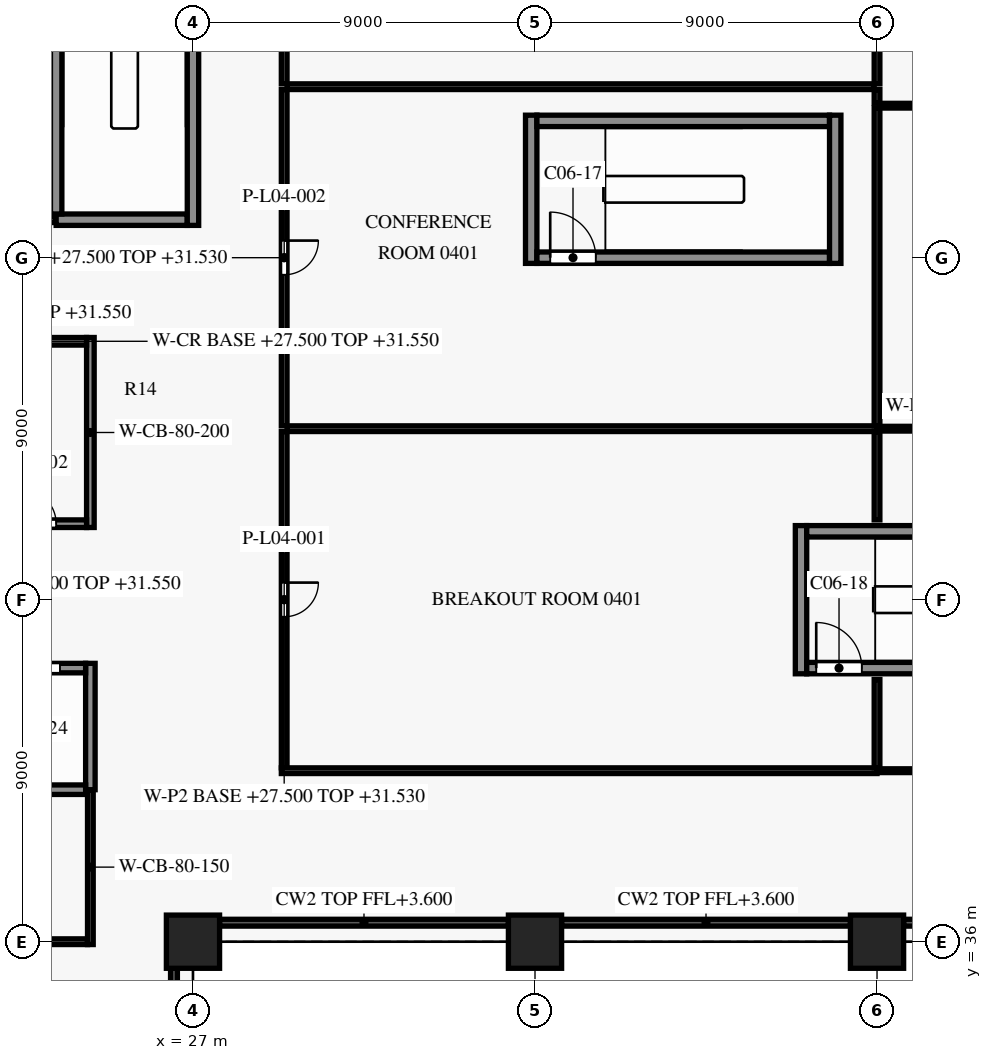
"""IFC4 building model, lengths in metres.
Left out: names, types, materials, properties, quantities, classifications, styles, units other than length and angle.
Written with IfcOpenShell. Run it as: python <this file> out.ifc"""

import sys

from ifc_helpers import new_model, si_unit, direction, frame, frame_2d, origin, origin_2d, place, context, subcontext, project, spatial, rectangle, extrude, element, fill, save


model = new_model("IFC4")
c1 = context("Model", 3, precision=1e-05, world=origin(), true_north=direction((0.0, 1.0)))
c2 = subcontext(c1, "Body", "Model", "MODEL_VIEW")
j1 = project(units=[si_unit("LENGTHUNIT", "METRE"), si_unit("PLANEANGLEUNIT", "RADIAN")], contexts=[c1])
p1 = place(None, origin())
s1 = spatial("IfcSite", under=j1, at=p1, CompositionType="ELEMENT")
p2 = place(p1, origin())
s2 = spatial("IfcBuilding", under=s1, at=p2, CompositionType="ELEMENT")
p3 = place(p2, frame((0.0, 0.0, 27.5)))
s3 = spatial("IfcBuildingStorey", under=s2, at=p3, CompositionType="ELEMENT", Elevation=27.5)
for number, where, z_axis, x_axis in (
    (1, (27.0, 36.0, 0.0), (0.0, 0.0, 1.0), (1.0, 0.0, 0.0)),
    (2, (36.0, 36.0, 0.0), (0.0, 0.0, 1.0), (1.0, 0.0, 0.0)),
    (3, (45.0, 36.0, 0.0), (0.0, 0.0, 1.0), (1.0, 0.0, 0.0)),
):
    element("IfcColumn", number, at=place(p3, frame(where, z_axis=z_axis, x_axis=x_axis)), inside=s3, PredefinedType="COLUMN", context=c2, shape_type="SweptSolid", body=[
        extrude(rectangle(XDim=1.4, YDim=1.4, at=origin_2d()), origin(), (0.0, 0.0, 1.0), 4.5),
    ])
p4 = place(p3, frame((12.4, 36.0, 0.0), z_axis=(0.0, 0.0, 1.0), x_axis=(1.0, 0.0, 0.0)))
e4 = element("IfcWall", 4, at=p4, inside=s3, PredefinedType="SHEAR", context=c2, shape_type="SweptSolid", body=[
    extrude(rectangle(XDim=11.825, YDim=0.15, at=frame_2d((5.913, 0.0))), origin(), (0.0, 0.0, 1.0), 4.2),
])
p5 = place(p4, frame((1.25, 0.0, 0.0)))
e5 = element("IfcOpeningElement", 5, at=p5, cuts=e4, PredefinedType="OPENING", context=c2, shape_type="SweptSolid", body=[
    extrude(rectangle(XDim=0.9, YDim=2.1, at=frame_2d((0.45, 1.05))), frame((0.0, 0.085, 0.0), z_axis=(0.0, -1.0, 0.0), x_axis=(1.0, 0.0, 0.0)), (0.0, 0.0, 1.0), 0.17),
])
p6 = place(p4, frame((5.2, 0.0, 0.0)))
e6 = element("IfcOpeningElement", 6, at=p6, cuts=e4, PredefinedType="OPENING", context=c2, shape_type="SweptSolid", body=[
    extrude(rectangle(XDim=0.9, YDim=2.1, at=frame_2d((0.45, 1.05))), frame((0.0, 0.085, 0.0), z_axis=(0.0, -1.0, 0.0), x_axis=(1.0, 0.0, 0.0)), (0.0, 0.0, 1.0), 0.17),
])
p7 = place(p4, frame((9.425, 0.0, 0.0)))
e7 = element("IfcOpeningElement", 7, at=p7, cuts=e4, PredefinedType="OPENING", context=c2, shape_type="SweptSolid", body=[
    extrude(rectangle(XDim=0.95, YDim=2.1, at=frame_2d((0.475, 1.05))), frame((0.0, 0.085, 0.0), z_axis=(0.0, -1.0, 0.0), x_axis=(1.0, 0.0, 0.0)), (0.0, 0.0, 1.0), 0.17),
])
p8 = place(p3, frame((8.1, 40.0, 0.0), z_axis=(0.0, 0.0, 1.0), x_axis=(1.0, 0.0, 0.0)))
e8 = element("IfcWall", 8, at=p8, inside=s3, PredefinedType="SHEAR", context=c2, shape_type="SweptSolid", body=[
    extrude(rectangle(XDim=16.075, YDim=0.25, at=frame_2d((8.038, 0.0))), origin(), (0.0, 0.0, 1.0), 4.2),
])
p9 = place(p3, frame((8.1, 43.2, 0.0), z_axis=(0.0, 0.0, 1.0), x_axis=(1.0, 0.0, 0.0)))
e9 = element("IfcWall", 9, at=p9, inside=s3, PredefinedType="SHEAR", context=c2, shape_type="SweptSolid", body=[
    extrude(rectangle(XDim=16.075, YDim=0.25, at=frame_2d((8.038, 0.0))), origin(), (0.0, 0.0, 1.0), 4.2),
])
p10 = place(p9, frame((14.3, 0.0, 0.0)))
e10 = element("IfcOpeningElement", 10, at=p10, cuts=e9, PredefinedType="OPENING", context=c2, shape_type="SweptSolid", body=[
    extrude(rectangle(XDim=1.1, YDim=2.1, at=frame_2d((0.55, 1.05))), frame((0.0, 0.135, 0.0), z_axis=(0.0, -1.0, 0.0), x_axis=(1.0, 0.0, 0.0)), (0.0, 0.0, 1.0), 0.27),
])
p11 = place(p9, frame((0.8, 0.0, 0.0)))
e11 = element("IfcOpeningElement", 11, at=p11, cuts=e9, PredefinedType="OPENING", context=c2, shape_type="SweptSolid", body=[
    extrude(rectangle(XDim=1.1, YDim=2.1, at=frame_2d((0.55, 1.05))), frame((0.0, 0.135, 0.0), z_axis=(0.0, -1.0, 0.0), x_axis=(1.0, 0.0, 0.0)), (0.0, 0.0, 1.0), 0.27),
])
p12 = place(p9, frame((3.5, 0.0, 0.0)))
e12 = element("IfcOpeningElement", 12, at=p12, cuts=e9, PredefinedType="OPENING", context=c2, shape_type="SweptSolid", body=[
    extrude(rectangle(XDim=1.1, YDim=2.1, at=frame_2d((0.55, 1.05))), frame((0.0, 0.135, 0.0), z_axis=(0.0, -1.0, 0.0), x_axis=(1.0, 0.0, 0.0)), (0.0, 0.0, 1.0), 0.27),
])
p13 = place(p9, frame((6.2, 0.0, 0.0)))
e13 = element("IfcOpeningElement", 13, at=p13, cuts=e9, PredefinedType="OPENING", context=c2, shape_type="SweptSolid", body=[
    extrude(rectangle(XDim=1.1, YDim=2.1, at=frame_2d((0.55, 1.05))), frame((0.0, 0.135, 0.0), z_axis=(0.0, -1.0, 0.0), x_axis=(1.0, 0.0, 0.0)), (0.0, 0.0, 1.0), 0.27),
])
p14 = place(p9, frame((8.9, 0.0, 0.0)))
e14 = element("IfcOpeningElement", 14, at=p14, cuts=e9, PredefinedType="OPENING", context=c2, shape_type="SweptSolid", body=[
    extrude(rectangle(XDim=1.1, YDim=2.1, at=frame_2d((0.55, 1.05))), frame((0.0, 0.135, 0.0), z_axis=(0.0, -1.0, 0.0), x_axis=(1.0, 0.0, 0.0)), (0.0, 0.0, 1.0), 0.27),
])
p15 = place(p9, frame((11.6, 0.0, 0.0)))
e15 = element("IfcOpeningElement", 15, at=p15, cuts=e9, PredefinedType="OPENING", context=c2, shape_type="SweptSolid", body=[
    extrude(rectangle(XDim=1.1, YDim=2.1, at=frame_2d((0.55, 1.05))), frame((0.0, 0.135, 0.0), z_axis=(0.0, -1.0, 0.0), x_axis=(1.0, 0.0, 0.0)), (0.0, 0.0, 1.0), 0.27),
])
p16 = place(p3, frame((43.15, 43.2, 0.0), z_axis=(0.0, 0.0, 1.0), x_axis=(1.0, 0.0, 0.0)))
e16 = element("IfcWall", 16, at=p16, inside=s3, PredefinedType="SHEAR", context=c2, shape_type="SweptSolid", body=[
    extrude(rectangle(XDim=7.7, YDim=0.3, at=frame_2d((3.85, 0.0))), origin(), (0.0, 0.0, 1.0), 4.2),
])
p17 = place(p16, frame((0.25, 0.0, 0.0)))
e17 = element("IfcOpeningElement", 17, at=p17, cuts=e16, PredefinedType="OPENING", context=c2, shape_type="SweptSolid", body=[
    extrude(rectangle(XDim=1.2, YDim=2.2, at=frame_2d((0.6, 1.1))), frame((0.0, 0.16, 0.0), z_axis=(0.0, -1.0, 0.0), x_axis=(1.0, 0.0, 0.0)), (0.0, 0.0, 1.0), 0.32),
])
p18 = place(p3, frame((43.15, 46.8, 0.0), z_axis=(0.0, 0.0, 1.0), x_axis=(1.0, 0.0, 0.0)))
e18 = element("IfcWall", 18, at=p18, inside=s3, PredefinedType="SHEAR", context=c2, shape_type="SweptSolid", body=[
    extrude(rectangle(XDim=7.7, YDim=0.3, at=frame_2d((3.85, 0.0))), origin(), (0.0, 0.0, 1.0), 4.2),
])
p19 = place(p3, frame((21.6, 47.0, 0.0), z_axis=(0.0, 0.0, 1.0), x_axis=(1.0, 0.0, 0.0)))
e19 = element("IfcWall", 19, at=p19, inside=s3, PredefinedType="PARTITIONING", context=c2, shape_type="SweptSolid", body=[
    extrude(rectangle(XDim=2.6, YDim=0.2, at=frame_2d((1.3, 0.0))), origin(), (0.0, 0.0, 1.0), 4.05),
])
p20 = place(p19, frame((0.9, 0.0, 0.0)))
e20 = element("IfcOpeningElement", 20, at=p20, cuts=e19, PredefinedType="OPENING", context=c2, shape_type="SweptSolid", body=[
    extrude(rectangle(XDim=0.9, YDim=2.1, at=frame_2d((0.45, 1.05))), frame((0.0, 0.11, 0.0), z_axis=(0.0, -1.0, 0.0), x_axis=(1.0, 0.0, 0.0)), (0.0, 0.0, 1.0), 0.22),
])
p21 = place(p3, frame((21.6, 51.8, 0.0), z_axis=(0.0, 0.0, 1.0), x_axis=(1.0, 0.0, 0.0)))
e21 = element("IfcWall", 21, at=p21, inside=s3, PredefinedType="PARTITIONING", context=c2, shape_type="SweptSolid", body=[
    extrude(rectangle(XDim=2.6, YDim=0.2, at=frame_2d((1.3, 0.0))), origin(), (0.0, 0.0, 1.0), 4.05),
])
p22 = place(p3, frame((36.05, 54.0, 0.0), z_axis=(0.0, 0.0, 1.0), x_axis=(1.0, 0.0, 0.0)))
e22 = element("IfcWall", 22, at=p22, inside=s3, PredefinedType="SHEAR", context=c2, shape_type="SweptSolid", body=[
    extrude(rectangle(XDim=7.7, YDim=0.3, at=frame_2d((3.85, 0.0))), origin(), (0.0, 0.0, 1.0), 4.2),
])
p23 = place(p22, frame((0.35, 0.0, 0.0)))
e23 = element("IfcOpeningElement", 23, at=p23, cuts=e22, PredefinedType="OPENING", context=c2, shape_type="SweptSolid", body=[
    extrude(rectangle(XDim=1.2, YDim=2.2, at=frame_2d((0.6, 1.1))), frame((0.0, 0.16, 0.0), z_axis=(0.0, -1.0, 0.0), x_axis=(1.0, 0.0, 0.0)), (0.0, 0.0, 1.0), 0.32),
])
p24 = place(p3, frame((13.5, 55.0, 0.0), z_axis=(0.0, 0.0, 1.0), x_axis=(1.0, 0.0, 0.0)))
e24 = element("IfcWall", 24, at=p24, inside=s3, PredefinedType="PARTITIONING", context=c2, shape_type="SweptSolid", body=[
    extrude(rectangle(XDim=9.9, YDim=0.15, at=frame_2d((4.95, 0.0))), origin(), (0.0, 0.0, 1.0), 4.05),
])
p25 = place(p24, frame((4.45, 0.0, 0.0)))
e25 = element("IfcOpeningElement", 25, at=p25, cuts=e24, PredefinedType="OPENING", context=c2, shape_type="SweptSolid", body=[
    extrude(rectangle(XDim=1.0, YDim=2.1, at=frame_2d((0.5, 1.05))), frame((0.0, 0.085, 0.0), z_axis=(0.0, -1.0, 0.0), x_axis=(1.0, 0.0, 0.0)), (0.0, 0.0, 1.0), 0.17),
])
p26 = place(p3, frame((23.4, 55.0, 0.0), z_axis=(0.0, 0.0, 1.0), x_axis=(1.0, 0.0, 0.0)))
e26 = element("IfcWall", 26, at=p26, inside=s3, PredefinedType="SHEAR", context=c2, shape_type="SweptSolid", body=[
    extrude(rectangle(XDim=3.45, YDim=0.3, at=frame_2d((1.725, 0.0))), origin(), (0.0, 0.0, 1.0), 4.2),
])
p27 = place(p3, frame((36.05, 57.6, 0.0), z_axis=(0.0, 0.0, 1.0), x_axis=(1.0, 0.0, 0.0)))
e27 = element("IfcWall", 27, at=p27, inside=s3, PredefinedType="SHEAR", context=c2, shape_type="SweptSolid", body=[
    extrude(rectangle(XDim=7.7, YDim=0.3, at=frame_2d((3.85, 0.0))), origin(), (0.0, 0.0, 1.0), 4.2),
])
p28 = place(p3, frame((23.4, 55.15, 0.0), z_axis=(0.0, 0.0, 1.0), x_axis=(0.0, 1.0, 0.0)))
e28 = element("IfcWall", 28, at=p28, inside=s3, PredefinedType="SHEAR", context=c2, shape_type="SweptSolid", body=[
    extrude(rectangle(XDim=8.0, YDim=0.3, at=frame_2d((4.0, 0.0))), origin(), (0.0, 0.0, 1.0), 4.2),
])
p29 = place(p3, frame((24.3, 35.925, 0.0), z_axis=(0.0, 0.0, 1.0), x_axis=(0.0, 1.0, 0.0)))
e29 = element("IfcWall", 29, at=p29, inside=s3, PredefinedType="SHEAR", context=c2, shape_type="SweptSolid", body=[
    extrude(rectangle(XDim=4.075, YDim=0.15, at=frame_2d((2.038, 0.0))), origin(), (0.0, 0.0, 1.0), 4.2),
])
p30 = place(p3, frame((24.3, 46.9, 0.0), z_axis=(0.0, 0.0, 1.0), x_axis=(0.0, 1.0, 0.0)))
e30 = element("IfcWall", 30, at=p30, inside=s3, PredefinedType="SHEAR", context=c2, shape_type="SweptSolid", body=[
    extrude(rectangle(XDim=5.0, YDim=0.2, at=frame_2d((2.5, 0.0))), origin(), (0.0, 0.0, 1.0), 4.2),
])
p31 = place(p3, frame((24.3, 40.0, 0.0), z_axis=(0.0, 0.0, 1.0), x_axis=(0.0, 1.0, 0.0)))
e31 = element("IfcWall", 31, at=p31, inside=s3, PredefinedType="SHEAR", context=c2, shape_type="SweptSolid", body=[
    extrude(rectangle(XDim=3.325, YDim=0.25, at=frame_2d((1.663, 0.0))), origin(), (0.0, 0.0, 1.0), 4.2),
])
p32 = place(p3, frame((27.0, 54.85, 0.0), z_axis=(0.0, 0.0, 1.0), x_axis=(0.0, 1.0, 0.0)))
e32 = element("IfcWall", 32, at=p32, inside=s3, PredefinedType="SHEAR", context=c2, shape_type="SweptSolid", body=[
    extrude(rectangle(XDim=8.35, YDim=0.3, at=frame_2d((4.175, 0.0))), origin(), (0.0, 0.0, 1.0), 4.2),
])
p33 = place(p32, frame((6.55, 0.0, 0.0)))
e33 = element("IfcOpeningElement", 33, at=p33, cuts=e32, PredefinedType="OPENING", context=c2, shape_type="SweptSolid", body=[
    extrude(rectangle(XDim=1.2, YDim=2.2, at=frame_2d((0.6, 1.1))), frame((0.0, 0.16, 0.0), z_axis=(0.0, -1.0, 0.0), x_axis=(1.0, 0.0, 0.0)), (0.0, 0.0, 1.0), 0.32),
])
for number, where, z_axis, x_axis in (
    (34, (35.9, 53.85, 0.0), (0.0, 0.0, 1.0), (0.0, 1.0, 0.0)),
    (35, (43.0, 43.05, 0.0), (0.0, 0.0, 1.0), (0.0, 1.0, 0.0)),
    (36, (43.9, 53.85, 0.0), (0.0, 0.0, 1.0), (0.0, 1.0, 0.0)),
):
    element("IfcWall", number, at=place(p3, frame(where, z_axis=z_axis, x_axis=x_axis)), inside=s3, PredefinedType="SHEAR", context=c2, shape_type="SweptSolid", body=[
        extrude(rectangle(XDim=3.9, YDim=0.3, at=frame_2d((1.95, 0.0))), origin(), (0.0, 0.0, 1.0), 4.2),
    ])
p34 = place(p3, frame((29.325, 40.5, 0.0), z_axis=(0.0, 0.0, 1.0), x_axis=(1.0, 0.0, 0.0)))
e37 = element("IfcWall", 37, at=p34, inside=s3, PredefinedType="PARTITIONING", context=c2, shape_type="SweptSolid", body=[
    extrude(rectangle(XDim=15.675, YDim=0.15, at=frame_2d((7.837, 0.0))), origin(), (0.0, 0.0, 1.0), 3.33),
])
p35 = place(p3, frame((45.0, 40.5, 0.0), z_axis=(0.0, 0.0, 1.0), x_axis=(1.0, 0.0, 0.0)))
e38 = element("IfcWall", 38, at=p35, inside=s3, PredefinedType="PARTITIONING", context=c2, shape_type="SweptSolid", body=[
    extrude(rectangle(XDim=9.05, YDim=0.1, at=frame_2d((4.525, 0.0))), origin(), (0.0, 0.0, 1.0), 3.33),
])
p36 = place(p3, frame((45.0, 42.9, 0.0), z_axis=(0.0, 0.0, 1.0), x_axis=(0.0, -1.0, 0.0)))
e39 = element("IfcWall", 39, at=p36, inside=s3, PredefinedType="PARTITIONING", context=c2, shape_type="SweptSolid", body=[
    extrude(rectangle(XDim=2.325, YDim=0.15, at=frame_2d((1.163, 0.0))), origin(), (0.0, 0.0, 1.0), 3.33),
])
p37 = place(p3, frame((29.4, 49.425, 0.0), z_axis=(0.0, 0.0, 1.0), x_axis=(0.0, -1.0, 0.0)))
e40 = element("IfcWall", 40, at=p37, inside=s3, PredefinedType="PARTITIONING", context=c2, shape_type="SweptSolid", body=[
    extrude(rectangle(XDim=8.85, YDim=0.15, at=frame_2d((4.425, 0.0))), origin(), (0.0, 0.0, 1.0), 4.03),
])
p38 = place(p37, frame((3.975, 0.0, 0.0)))
e41 = element("IfcOpeningElement", 41, at=p38, cuts=e40, PredefinedType="OPENING", context=c2, shape_type="SweptSolid", body=[
    extrude(rectangle(XDim=0.9, YDim=2.1, at=frame_2d((0.45, 1.05))), frame((0.0, 0.085, 0.0), z_axis=(0.0, -1.0, 0.0), x_axis=(1.0, 0.0, 0.0)), (0.0, 0.0, 1.0), 0.17),
])
p39 = place(p3, frame((45.0, 49.425, 0.0), z_axis=(0.0, 0.0, 1.0), x_axis=(0.0, -1.0, 0.0)))
e42 = element("IfcWall", 42, at=p39, inside=s3, PredefinedType="PARTITIONING", context=c2, shape_type="SweptSolid", body=[
    extrude(rectangle(XDim=2.325, YDim=0.15, at=frame_2d((1.163, 0.0))), origin(), (0.0, 0.0, 1.0), 3.33),
])
p40 = place(p3, frame((29.475, 49.5, 0.0), z_axis=(0.0, 0.0, 1.0), x_axis=(1.0, 0.0, 0.0)))
e43 = element("IfcWall", 43, at=p40, inside=s3, PredefinedType="PARTITIONING", context=c2, shape_type="SweptSolid", body=[
    extrude(rectangle(XDim=15.525, YDim=0.15, at=frame_2d((7.762, 0.0))), origin(), (0.0, 0.0, 1.0), 3.33),
])
p41 = place(p3, frame((45.0, 49.5, 0.0), z_axis=(0.0, 0.0, 1.0), x_axis=(1.0, 0.0, 0.0)))
e44 = element("IfcWall", 44, at=p41, inside=s3, PredefinedType="PARTITIONING", context=c2, shape_type="SweptSolid", body=[
    extrude(rectangle(XDim=8.938, YDim=0.125, at=frame_2d((4.469, 0.0))), origin(), (0.0, 0.0, 1.0), 3.33),
])
p42 = place(p3, frame((45.0, 57.938, 0.0), z_axis=(0.0, 0.0, 1.0), x_axis=(0.0, -1.0, 0.0)))
e45 = element("IfcWall", 45, at=p42, inside=s3, PredefinedType="PARTITIONING", context=c2, shape_type="SweptSolid", body=[
    extrude(rectangle(XDim=8.363, YDim=0.15, at=frame_2d((4.181, 0.0))), origin(), (0.0, 0.0, 1.0), 3.33),
])
p43 = place(p3, frame((45.075, 58.0, 0.0), z_axis=(0.0, 0.0, 1.0), x_axis=(1.0, 0.0, 0.0)))
e46 = element("IfcWall", 46, at=p43, inside=s3, PredefinedType="PARTITIONING", context=c2, shape_type="SweptSolid", body=[
    extrude(rectangle(XDim=8.863, YDim=0.125, at=frame_2d((4.431, 0.0))), origin(), (0.0, 0.0, 1.0), 3.33),
])
p44 = place(p3, frame((29.4, 58.425, 0.0), z_axis=(0.0, 0.0, 1.0), x_axis=(0.0, -1.0, 0.0)))
e47 = element("IfcWall", 47, at=p44, inside=s3, PredefinedType="PARTITIONING", context=c2, shape_type="SweptSolid", body=[
    extrude(rectangle(XDim=8.85, YDim=0.15, at=frame_2d((4.425, 0.0))), origin(), (0.0, 0.0, 1.0), 4.03),
])
p45 = place(p44, frame((3.975, 0.0, 0.0)))
e48 = element("IfcOpeningElement", 48, at=p45, cuts=e47, PredefinedType="OPENING", context=c2, shape_type="SweptSolid", body=[
    extrude(rectangle(XDim=0.9, YDim=2.1, at=frame_2d((0.45, 1.05))), frame((0.0, 0.085, 0.0), z_axis=(0.0, -1.0, 0.0), x_axis=(1.0, 0.0, 0.0)), (0.0, 0.0, 1.0), 0.17),
])
p46 = place(p3, frame((45.0, 58.425, 0.0), z_axis=(0.0, 0.0, 1.0), x_axis=(0.0, -1.0, 0.0)))
e49 = element("IfcWall", 49, at=p46, inside=s3, PredefinedType="PARTITIONING", context=c2, shape_type="SweptSolid", body=[
    extrude(rectangle(XDim=0.363, YDim=0.15, at=frame_2d((0.181, 0.0))), origin(), (0.0, 0.0, 1.0), 3.33),
])
p47 = place(p3, frame((29.475, 58.5, 0.0), z_axis=(0.0, 0.0, 1.0), x_axis=(1.0, 0.0, 0.0)))
e50 = element("IfcWall", 50, at=p47, inside=s3, PredefinedType="PARTITIONING", context=c2, shape_type="SweptSolid", body=[
    extrude(rectangle(XDim=15.45, YDim=0.15, at=frame_2d((7.725, 0.0))), origin(), (0.0, 0.0, 1.0), 3.33),
])
p48 = place(p3, frame((29.4, 63.338, 0.0), z_axis=(0.0, 0.0, 1.0), x_axis=(0.0, -1.0, 0.0)))
e51 = element("IfcWall", 51, at=p48, inside=s3, PredefinedType="PARTITIONING", context=c2, shape_type="SweptSolid", body=[
    extrude(rectangle(XDim=4.763, YDim=0.15, at=frame_2d((2.382, 0.0))), origin(), (0.0, 0.0, 1.0), 4.03),
])
p49 = place(p48, frame((0.838, 0.0, 0.0)))
e52 = element("IfcOpeningElement", 52, at=p49, cuts=e51, PredefinedType="OPENING", context=c2, shape_type="SweptSolid", body=[
    extrude(rectangle(XDim=0.9, YDim=2.1, at=frame_2d((0.45, 1.05))), frame((0.0, 0.085, 0.0), z_axis=(0.0, -1.0, 0.0), x_axis=(1.0, 0.0, 0.0)), (0.0, 0.0, 1.0), 0.17),
])
p50 = place(p3, frame((45.0, 63.18, 0.0), z_axis=(0.0, 0.0, 1.0), x_axis=(0.0, -1.0, 0.0)))
e53 = element("IfcWall", 53, at=p50, inside=s3, PredefinedType="PARTITIONING", context=c2, shape_type="SweptSolid", body=[
    extrude(rectangle(XDim=4.605, YDim=0.15, at=frame_2d((2.302, 0.0))), origin(), (0.0, 0.0, 1.0), 3.33),
])
p51 = place(p20, origin())
e54 = element("IfcDoor", 54, at=p51, inside=s3, OperationType="SINGLE_SWING_LEFT", PredefinedType="DOOR", context=c2, shape_type="SweptSolid", body=[
    extrude(rectangle(XDim=0.9, YDim=2.1, at=frame_2d((0.45, 1.05))), frame((0.0, 0.025, 0.0), z_axis=(0.0, -1.0, 0.0), x_axis=(1.0, 0.0, 0.0)), (0.0, 0.0, 1.0), 0.05),
])
fill(e20, e54)
p52 = place(p23, origin())
e55 = element("IfcDoor", 55, at=p52, inside=s3, OperationType="SINGLE_SWING_LEFT", PredefinedType="DOOR", context=c2, shape_type="SweptSolid", body=[
    extrude(rectangle(XDim=1.2, YDim=2.2, at=frame_2d((0.6, 1.1))), frame((0.0, 0.025, 0.0), z_axis=(0.0, -1.0, 0.0), x_axis=(1.0, 0.0, 0.0)), (0.0, 0.0, 1.0), 0.05),
])
fill(e23, e55)
p53 = place(p17, origin())
e56 = element("IfcDoor", 56, at=p53, inside=s3, OperationType="SINGLE_SWING_RIGHT", PredefinedType="DOOR", context=c2, shape_type="SweptSolid", body=[
    extrude(rectangle(XDim=1.2, YDim=2.2, at=frame_2d((0.6, 1.1))), frame((0.0, 0.025, 0.0), z_axis=(0.0, -1.0, 0.0), x_axis=(1.0, 0.0, 0.0)), (0.0, 0.0, 1.0), 0.05),
])
fill(e17, e56)
p54 = place(p10, origin())
e57 = element("IfcDoor", 57, at=p54, inside=s3, OperationType="DOUBLE_DOOR_SLIDING", PredefinedType="DOOR", context=c2, shape_type="SweptSolid", body=[
    extrude(rectangle(XDim=1.1, YDim=2.1, at=frame_2d((0.55, 1.05))), frame((0.0, 0.025, 0.0), z_axis=(0.0, -1.0, 0.0), x_axis=(1.0, 0.0, 0.0)), (0.0, 0.0, 1.0), 0.05),
])
fill(e10, e57)
p55 = place(p38, origin())
e58 = element("IfcDoor", 58, at=p55, inside=s3, OperationType="SINGLE_SWING_LEFT", PredefinedType="DOOR", context=c2, shape_type="SweptSolid", body=[
    extrude(rectangle(XDim=0.9, YDim=2.1, at=frame_2d((0.45, 1.05))), frame((0.0, 0.025, 0.0), z_axis=(0.0, -1.0, 0.0), x_axis=(1.0, 0.0, 0.0)), (0.0, 0.0, 1.0), 0.05),
])
fill(e41, e58)
p56 = place(p45, origin())
e59 = element("IfcDoor", 59, at=p56, inside=s3, OperationType="SINGLE_SWING_LEFT", PredefinedType="DOOR", context=c2, shape_type="SweptSolid", body=[
    extrude(rectangle(XDim=0.9, YDim=2.1, at=frame_2d((0.45, 1.05))), frame((0.0, 0.025, 0.0), z_axis=(0.0, -1.0, 0.0), x_axis=(1.0, 0.0, 0.0)), (0.0, 0.0, 1.0), 0.05),
])
fill(e48, e59)
save(model, sys.argv[1])
